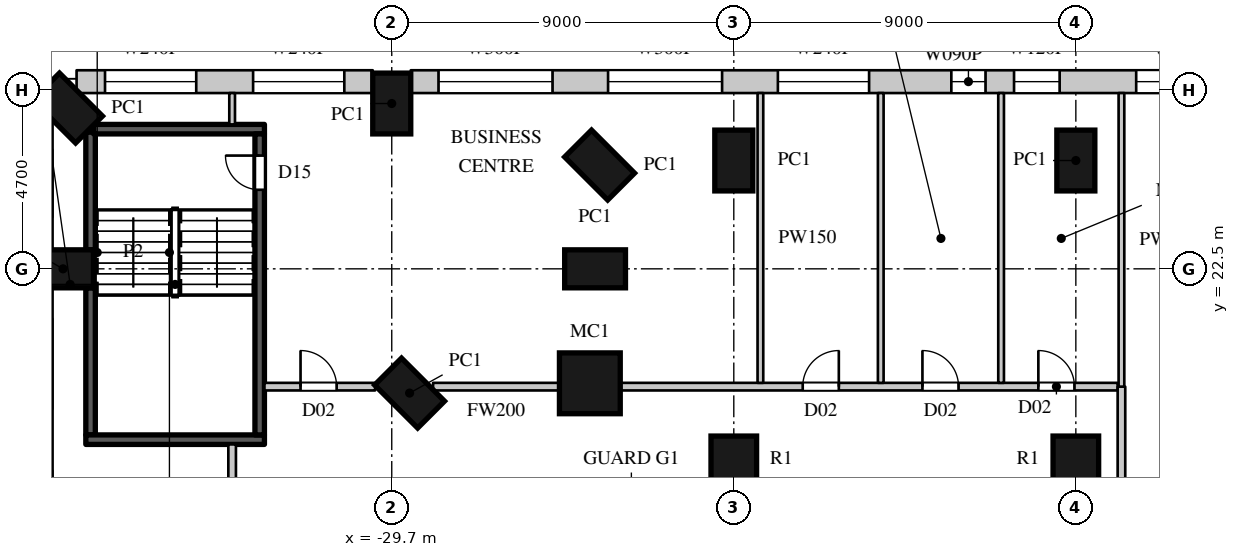
"""IFC4 building model, lengths in metres.
Left out: names, types, materials, properties, quantities, classifications, styles, units other than length and angle.
Written with IfcOpenShell. Run it as: python <this file> out.ifc"""

import sys

from ifc_helpers import new_model, si_unit, direction, frame, frame_2d, origin, origin_2d, place, context, subcontext, project, spatial, rectangle, circle, extrude, element, fill, save


model = new_model("IFC4")
c1 = context("Model", 3, precision=1e-05, world=origin(), true_north=direction((0.0, 1.0)))
c2 = subcontext(c1, "Body", "Model", "MODEL_VIEW")
j1 = project(units=[si_unit("LENGTHUNIT", "METRE"), si_unit("PLANEANGLEUNIT", "RADIAN")], contexts=[c1])
p1 = place(None, origin())
s1 = spatial("IfcSite", under=j1, at=p1, CompositionType="ELEMENT")
p2 = place(p1, origin())
s2 = spatial("IfcBuilding", under=s1, at=p2, CompositionType="ELEMENT")
p3 = place(p2, frame((0.0, 0.0, 44.0)))
s3 = spatial("IfcBuildingStorey", under=s2, at=p3, CompositionType="ELEMENT", Elevation=44.0)
for number, where, z_axis, x_axis in (
    (1, (-29.231, 19.231, 0.0), (0.0, 0.0, 1.0), (-0.707, -0.707, 0.0)),
    (2, (-11.7, 25.35, 0.0), (0.0, 0.0, 1.0), (-1.0, 0.0, 0.0)),
    (3, (-20.7, 25.35, 0.0), (0.0, 0.0, 1.0), (-1.0, 0.0, 0.0)),
    (4, (-24.231, 25.231, 0.0), (0.0, 0.0, 1.0), (-0.707, -0.707, 0.0)),
    (5, (-24.35, 22.5, 0.0), (0.0, 0.0, 1.0), (0.0, -1.0, 0.0)),
):
    element("IfcColumn", number, at=place(p3, frame(where, z_axis=z_axis, x_axis=x_axis)), inside=s3, PredefinedType="COLUMN", context=c2, shape_type="SweptSolid", body=[
        extrude(rectangle(XDim=1.0, YDim=1.6, at=origin_2d()), origin(), (0.0, 0.0, 1.0), 6.0),
    ])
p4 = place(p3, frame((-24.488, 19.488, 0.0), z_axis=(0.0, 0.0, 1.0), x_axis=(1.0, 0.0, 0.0)))
e6 = element("IfcColumn", 6, at=p4, inside=s3, PredefinedType="COLUMN", context=c2, shape_type="SweptSolid", body=[
    extrude(circle(Radius=0.8, at=origin_2d()), origin(), (0.0, 0.0, 1.0), 6.0),
])
for number, where, z_axis, x_axis in (
    (7, (-29.7, 26.85, 0.0), (0.0, 0.0, 1.0), (-1.0, 0.0, 0.0)),
    (8, (-38.231, 26.731, 0.0), (0.0, 0.0, 1.0), (-0.707, -0.707, 0.0)),
    (9, (-38.35, 22.5, 0.0), (0.0, 0.0, 1.0), (0.0, -1.0, 0.0)),
):
    element("IfcColumn", number, at=place(p3, frame(where, z_axis=z_axis, x_axis=x_axis)), inside=s3, PredefinedType="COLUMN", context=c2, shape_type="SweptSolid", body=[
        extrude(rectangle(XDim=1.0, YDim=1.6, at=origin_2d()), origin(), (0.0, 0.0, 1.0), 6.0),
    ])
for number, where, z_axis, x_axis in (
    (10, (-20.7, 17.5, 0.0), (0.0, 0.0, 1.0), (1.0, 0.0, 0.0)),
    (11, (-11.7, 17.5, 0.0), (0.0, 0.0, 1.0), (1.0, 0.0, 0.0)),
):
    element("IfcColumn", number, at=place(p3, frame(where, z_axis=z_axis, x_axis=x_axis)), inside=s3, PredefinedType="COLUMN", context=c2, shape_type="SweptSolid", body=[
        extrude(circle(Radius=0.6, at=origin_2d()), origin(), (0.0, 0.0, 1.0), 6.0),
    ])
p5 = place(p3, frame((24.334, 27.425, 0.0), z_axis=(0.0, 0.0, 1.0), x_axis=(-1.0, 0.0, 0.0)))
e12 = element("IfcWall", 12, at=p5, inside=s3, PredefinedType="ELEMENTEDWALL", context=c2, shape_type="SweptSolid", body=[
    extrude(rectangle(XDim=53.534, YDim=0.6, at=frame_2d((26.767, 0.0))), origin(), (0.0, 0.0, 1.0), 5.596),
])
p6 = place(p5, frame((0.731, 0.0, 1.2)))
e13 = element("IfcOpeningElement", 13, at=p6, cuts=e12, PredefinedType="OPENING", context=c2, shape_type="SweptSolid", body=[
    extrude(rectangle(XDim=3.0, YDim=2.4, at=frame_2d((1.5, 1.2))), frame((0.0, 0.31, 0.0), z_axis=(0.0, -1.0, 0.0), x_axis=(1.0, 0.0, 0.0)), (0.0, 0.0, 1.0), 0.62),
])
p7 = place(p5, frame((5.192, 0.0, 1.2)))
e14 = element("IfcOpeningElement", 14, at=p7, cuts=e12, PredefinedType="OPENING", context=c2, shape_type="SweptSolid", body=[
    extrude(rectangle(XDim=3.0, YDim=2.4, at=frame_2d((1.5, 1.2))), frame((0.0, 0.31, 0.0), z_axis=(0.0, -1.0, 0.0), x_axis=(1.0, 0.0, 0.0)), (0.0, 0.0, 1.0), 0.62),
])
p8 = place(p5, frame((14.114, 0.0, 1.2)))
e15 = element("IfcOpeningElement", 15, at=p8, cuts=e12, PredefinedType="OPENING", context=c2, shape_type="SweptSolid", body=[
    extrude(rectangle(XDim=3.0, YDim=2.4, at=frame_2d((1.5, 1.2))), frame((0.0, 0.31, 0.0), z_axis=(0.0, -1.0, 0.0), x_axis=(1.0, 0.0, 0.0)), (0.0, 0.0, 1.0), 0.62),
])
p9 = place(p5, frame((18.575, 0.0, 1.2)))
e16 = element("IfcOpeningElement", 16, at=p9, cuts=e12, PredefinedType="OPENING", context=c2, shape_type="SweptSolid", body=[
    extrude(rectangle(XDim=3.0, YDim=2.4, at=frame_2d((1.5, 1.2))), frame((0.0, 0.31, 0.0), z_axis=(0.0, -1.0, 0.0), x_axis=(1.0, 0.0, 0.0)), (0.0, 0.0, 1.0), 0.62),
])
p10 = place(p5, frame((23.037, 0.0, 1.2)))
e17 = element("IfcOpeningElement", 17, at=p10, cuts=e12, PredefinedType="OPENING", context=c2, shape_type="SweptSolid", body=[
    extrude(rectangle(XDim=3.0, YDim=2.4, at=frame_2d((1.5, 1.2))), frame((0.0, 0.31, 0.0), z_axis=(0.0, -1.0, 0.0), x_axis=(1.0, 0.0, 0.0)), (0.0, 0.0, 1.0), 0.62),
])
p11 = place(p5, frame((27.498, 0.0, 1.2)))
e18 = element("IfcOpeningElement", 18, at=p11, cuts=e12, PredefinedType="OPENING", context=c2, shape_type="SweptSolid", body=[
    extrude(rectangle(XDim=3.0, YDim=2.4, at=frame_2d((1.5, 1.2))), frame((0.0, 0.31, 0.0), z_axis=(0.0, -1.0, 0.0), x_axis=(1.0, 0.0, 0.0)), (0.0, 0.0, 1.0), 0.62),
])
p12 = place(p5, frame((45.343, 0.0, 1.2)))
e19 = element("IfcOpeningElement", 19, at=p12, cuts=e12, PredefinedType="OPENING", context=c2, shape_type="SweptSolid", body=[
    extrude(rectangle(XDim=3.0, YDim=2.4, at=frame_2d((1.5, 1.2))), frame((0.0, 0.31, 0.0), z_axis=(0.0, -1.0, 0.0), x_axis=(1.0, 0.0, 0.0)), (0.0, 0.0, 1.0), 0.62),
])
p13 = place(p5, frame((49.804, 0.0, 1.2)))
e20 = element("IfcOpeningElement", 20, at=p13, cuts=e12, PredefinedType="OPENING", context=c2, shape_type="SweptSolid", body=[
    extrude(rectangle(XDim=3.0, YDim=2.4, at=frame_2d((1.5, 1.2))), frame((0.0, 0.31, 0.0), z_axis=(0.0, -1.0, 0.0), x_axis=(1.0, 0.0, 0.0)), (0.0, 0.0, 1.0), 0.62),
])
p14 = place(p5, frame((10.194, 0.0, 1.2)))
e21 = element("IfcOpeningElement", 21, at=p14, cuts=e12, PredefinedType="OPENING", context=c2, shape_type="SweptSolid", body=[
    extrude(rectangle(XDim=2.4, YDim=2.4, at=frame_2d((1.2, 1.2))), frame((0.0, 0.31, 0.0), z_axis=(0.0, -1.0, 0.0), x_axis=(1.0, 0.0, 0.0)), (0.0, 0.0, 1.0), 0.62),
])
p15 = place(p5, frame((32.047, 0.0, 1.2)))
e22 = element("IfcOpeningElement", 22, at=p15, cuts=e12, PredefinedType="OPENING", context=c2, shape_type="SweptSolid", body=[
    extrude(rectangle(XDim=2.4, YDim=2.4, at=frame_2d((1.2, 1.2))), frame((0.0, 0.31, 0.0), z_axis=(0.0, -1.0, 0.0), x_axis=(1.0, 0.0, 0.0)), (0.0, 0.0, 1.0), 0.62),
])
p16 = place(p5, frame((36.461, 0.0, 1.2)))
e23 = element("IfcOpeningElement", 23, at=p16, cuts=e12, PredefinedType="OPENING", context=c2, shape_type="SweptSolid", body=[
    extrude(rectangle(XDim=1.2, YDim=2.4, at=frame_2d((0.6, 1.2))), frame((0.0, 0.31, 0.0), z_axis=(0.0, -1.0, 0.0), x_axis=(1.0, 0.0, 0.0)), (0.0, 0.0, 1.0), 0.62),
])
p17 = place(p5, frame((38.411, 0.0, 1.2)))
e24 = element("IfcOpeningElement", 24, at=p17, cuts=e12, PredefinedType="OPENING", context=c2, shape_type="SweptSolid", body=[
    extrude(rectangle(XDim=0.9, YDim=2.4, at=frame_2d((0.45, 1.2))), frame((0.0, 0.31, 0.0), z_axis=(0.0, -1.0, 0.0), x_axis=(1.0, 0.0, 0.0)), (0.0, 0.0, 1.0), 0.62),
])
p18 = place(p5, frame((41.475, 0.0, 1.2)))
e25 = element("IfcOpeningElement", 25, at=p18, cuts=e12, PredefinedType="OPENING", context=c2, shape_type="SweptSolid", body=[
    extrude(rectangle(XDim=2.4, YDim=2.4, at=frame_2d((1.2, 1.2))), frame((0.0, 0.31, 0.0), z_axis=(0.0, -1.0, 0.0), x_axis=(1.0, 0.0, 0.0)), (0.0, 0.0, 1.0), 0.62),
])
p19 = place(p3, frame((-30.2, 27.425, 0.0), z_axis=(0.0, 0.0, 1.0), x_axis=(-1.0, 0.0, 0.0)))
e26 = element("IfcWall", 26, at=p19, inside=s3, PredefinedType="ELEMENTEDWALL", context=c2, shape_type="SweptSolid", body=[
    extrude(rectangle(XDim=7.793, YDim=0.6, at=frame_2d((3.896, 0.0))), origin(), (0.0, 0.0, 1.0), 5.596),
])
p20 = place(p19, frame((0.748, 0.0, 1.2)))
e27 = element("IfcOpeningElement", 27, at=p20, cuts=e26, PredefinedType="OPENING", context=c2, shape_type="SweptSolid", body=[
    extrude(rectangle(XDim=2.4, YDim=2.4, at=frame_2d((1.2, 1.2))), frame((0.0, 0.31, 0.0), z_axis=(0.0, -1.0, 0.0), x_axis=(1.0, 0.0, 0.0)), (0.0, 0.0, 1.0), 0.62),
])
p21 = place(p19, frame((4.645, 0.0, 1.2)))
e28 = element("IfcOpeningElement", 28, at=p21, cuts=e26, PredefinedType="OPENING", context=c2, shape_type="SweptSolid", body=[
    extrude(rectangle(XDim=2.4, YDim=2.4, at=frame_2d((1.2, 1.2))), frame((0.0, 0.31, 0.0), z_axis=(0.0, -1.0, 0.0), x_axis=(1.0, 0.0, 0.0)), (0.0, 0.0, 1.0), 0.62),
])
p22 = place(p3, frame((-33.9, -17.88, 0.0), z_axis=(0.0, 0.0, 1.0), x_axis=(0.0, 1.0, 0.0)))
e29 = element("IfcWall", 29, at=p22, inside=s3, PredefinedType="PARTITIONING", context=c2, shape_type="SweptSolid", body=[
    extrude(rectangle(XDim=35.76, YDim=0.2, at=frame_2d((17.88, 0.0))), origin(), (0.0, 0.0, 1.0), 5.596),
])
p23 = place(p22, frame((1.05, 0.0, 0.0)))
e30 = element("IfcOpeningElement", 30, at=p23, cuts=e29, PredefinedType="OPENING", context=c2, shape_type="SweptSolid", body=[
    extrude(rectangle(XDim=0.9, YDim=2.2, at=frame_2d((0.45, 1.1))), frame((0.0, 0.11, 0.0), z_axis=(0.0, -1.0, 0.0), x_axis=(1.0, 0.0, 0.0)), (0.0, 0.0, 1.0), 0.22),
])
p24 = place(p22, frame((4.9, 0.0, 0.0)))
e31 = element("IfcOpeningElement", 31, at=p24, cuts=e29, PredefinedType="OPENING", context=c2, shape_type="SweptSolid", body=[
    extrude(rectangle(XDim=0.9, YDim=2.2, at=frame_2d((0.45, 1.1))), frame((0.0, 0.11, 0.0), z_axis=(0.0, -1.0, 0.0), x_axis=(1.0, 0.0, 0.0)), (0.0, 0.0, 1.0), 0.22),
])
p25 = place(p22, frame((8.9, 0.0, 0.0)))
e32 = element("IfcOpeningElement", 32, at=p25, cuts=e29, PredefinedType="OPENING", context=c2, shape_type="SweptSolid", body=[
    extrude(rectangle(XDim=0.9, YDim=2.2, at=frame_2d((0.45, 1.1))), frame((0.0, 0.11, 0.0), z_axis=(0.0, -1.0, 0.0), x_axis=(1.0, 0.0, 0.0)), (0.0, 0.0, 1.0), 0.22),
])
p26 = place(p22, frame((12.9, 0.0, 0.0)))
e33 = element("IfcOpeningElement", 33, at=p26, cuts=e29, PredefinedType="OPENING", context=c2, shape_type="SweptSolid", body=[
    extrude(rectangle(XDim=0.95, YDim=2.2, at=frame_2d((0.475, 1.1))), frame((0.0, 0.11, 0.0), z_axis=(0.0, -1.0, 0.0), x_axis=(1.0, 0.0, 0.0)), (0.0, 0.0, 1.0), 0.22),
])
p27 = place(p22, frame((21.4, 0.0, 0.0)))
e34 = element("IfcOpeningElement", 34, at=p27, cuts=e29, PredefinedType="OPENING", context=c2, shape_type="SweptSolid", body=[
    extrude(rectangle(XDim=0.95, YDim=2.2, at=frame_2d((0.475, 1.1))), frame((0.0, 0.11, 0.0), z_axis=(0.0, -1.0, 0.0), x_axis=(1.0, 0.0, 0.0)), (0.0, 0.0, 1.0), 0.22),
])
p28 = place(p22, frame((31.25, 0.0, 0.0)))
e35 = element("IfcOpeningElement", 35, at=p28, cuts=e29, PredefinedType="OPENING", context=c2, shape_type="SweptSolid", body=[
    extrude(rectangle(XDim=0.95, YDim=2.2, at=frame_2d((0.475, 1.1))), frame((0.0, 0.11, 0.0), z_axis=(0.0, -1.0, 0.0), x_axis=(1.0, 0.0, 0.0)), (0.0, 0.0, 1.0), 0.22),
])
p29 = place(p3, frame((-33.05, 19.4, 0.0), z_axis=(0.0, 0.0, 1.0), x_axis=(1.0, 0.0, 0.0)))
e36 = element("IfcWall", 36, at=p29, inside=s3, PredefinedType="PARTITIONING", context=c2, shape_type="SweptSolid", body=[
    extrude(rectangle(XDim=2.913, YDim=0.2, at=frame_2d((1.457, 0.0))), origin(), (0.0, 0.0, 1.0), 5.596),
])
p30 = place(p29, frame((0.95, 0.0, 0.0)))
e37 = element("IfcOpeningElement", 37, at=p30, cuts=e36, PredefinedType="OPENING", context=c2, shape_type="SweptSolid", body=[
    extrude(rectangle(XDim=0.95, YDim=2.2, at=frame_2d((0.475, 1.1))), frame((0.0, 0.11, 0.0), z_axis=(0.0, -1.0, 0.0), x_axis=(1.0, 0.0, 0.0)), (0.0, 0.0, 1.0), 0.22),
])
p31 = place(p3, frame((-28.613, 19.4, 0.0), z_axis=(0.0, 0.0, 1.0), x_axis=(1.0, 0.0, 0.0)))
e38 = element("IfcWall", 38, at=p31, inside=s3, PredefinedType="PARTITIONING", context=c2, shape_type="SweptSolid", body=[
    extrude(rectangle(XDim=3.323, YDim=0.2, at=frame_2d((1.662, 0.0))), origin(), (0.0, 0.0, 1.0), 3.85),
])
p32 = place(p3, frame((-23.687, 19.4, 0.0), z_axis=(0.0, 0.0, 1.0), x_axis=(1.0, 0.0, 0.0)))
e39 = element("IfcWall", 39, at=p32, inside=s3, PredefinedType="PARTITIONING", context=c2, shape_type="SweptSolid", body=[
    extrude(rectangle(XDim=13.086, YDim=0.2, at=frame_2d((6.543, 0.0))), origin(), (0.0, 0.0, 1.0), 5.596),
])
p33 = place(p32, frame((4.8, 0.0, 0.0)))
e40 = element("IfcOpeningElement", 40, at=p33, cuts=e39, PredefinedType="OPENING", context=c2, shape_type="SweptSolid", body=[
    extrude(rectangle(XDim=0.95, YDim=2.2, at=frame_2d((0.475, 1.1))), frame((0.0, 0.11, 0.0), z_axis=(0.0, -1.0, 0.0), x_axis=(1.0, 0.0, 0.0)), (0.0, 0.0, 1.0), 0.22),
])
p34 = place(p32, frame((7.95, 0.0, 0.0)))
e41 = element("IfcOpeningElement", 41, at=p34, cuts=e39, PredefinedType="OPENING", context=c2, shape_type="SweptSolid", body=[
    extrude(rectangle(XDim=0.95, YDim=2.2, at=frame_2d((0.475, 1.1))), frame((0.0, 0.11, 0.0), z_axis=(0.0, -1.0, 0.0), x_axis=(1.0, 0.0, 0.0)), (0.0, 0.0, 1.0), 0.22),
])
p35 = place(p32, frame((11.0, 0.0, 0.0)))
e42 = element("IfcOpeningElement", 42, at=p35, cuts=e39, PredefinedType="OPENING", context=c2, shape_type="SweptSolid", body=[
    extrude(rectangle(XDim=0.95, YDim=2.2, at=frame_2d((0.475, 1.1))), frame((0.0, 0.11, 0.0), z_axis=(0.0, -1.0, 0.0), x_axis=(1.0, 0.0, 0.0)), (0.0, 0.0, 1.0), 0.22),
])
p36 = place(p3, frame((-10.5, -19.4, 0.0), z_axis=(0.0, 0.0, 1.0), x_axis=(0.0, 1.0, 0.0)))
e43 = element("IfcWall", 43, at=p36, inside=s3, PredefinedType="PARTITIONING", context=c2, shape_type="SweptSolid", body=[
    extrude(rectangle(XDim=38.8, YDim=0.2, at=frame_2d((19.4, 0.0))), origin(), (0.0, 0.0, 1.0), 5.596),
])
p37 = place(p36, frame((18.65, 0.0, 0.0)))
e44 = element("IfcOpeningElement", 44, at=p37, cuts=e43, PredefinedType="OPENING", context=c2, shape_type="SweptSolid", body=[
    extrude(rectangle(XDim=1.5, YDim=2.4, at=frame_2d((0.75, 1.2))), frame((0.0, 0.11, 0.0), z_axis=(0.0, -1.0, 0.0), x_axis=(1.0, 0.0, 0.0)), (0.0, 0.0, 1.0), 0.22),
])
p38 = place(p3, frame((-33.9, 26.3, 0.0), z_axis=(0.0, 0.0, 1.0), x_axis=(0.0, 1.0, 0.0)))
e45 = element("IfcWall", 45, at=p38, inside=s3, PredefinedType="PARTITIONING", context=c2, shape_type="SweptSolid", body=[
    extrude(rectangle(XDim=0.825, YDim=0.15, at=frame_2d((0.413, 0.0))), origin(), (0.0, 0.0, 1.0), 5.596),
])
for number, where, z_axis, x_axis in (
    (46, (-20.0, 19.5, 0.0), (0.0, 0.0, 1.0), (0.0, 1.0, 0.0)),
    (47, (-16.833, 19.5, 0.0), (0.0, 0.0, 1.0), (0.0, 1.0, 0.0)),
    (48, (-13.667, 19.5, 0.0), (0.0, 0.0, 1.0), (0.0, 1.0, 0.0)),
):
    element("IfcWall", number, at=place(p3, frame(where, z_axis=z_axis, x_axis=x_axis)), inside=s3, PredefinedType="PARTITIONING", context=c2, shape_type="SweptSolid", body=[
        extrude(rectangle(XDim=7.625, YDim=0.15, at=frame_2d((3.812, 0.0))), origin(), (0.0, 0.0, 1.0), 5.596),
    ])
p39 = place(p3, frame((-10.5, 19.4, 0.0), z_axis=(0.0, 0.0, 1.0), x_axis=(0.0, 1.0, 0.0)))
e49 = element("IfcWall", 49, at=p39, inside=s3, PredefinedType="PARTITIONING", context=c2, shape_type="SweptSolid", body=[
    extrude(rectangle(XDim=7.725, YDim=0.15, at=frame_2d((3.863, 0.0))), origin(), (0.0, 0.0, 1.0), 5.596),
])
p40 = place(p3, frame((-37.625, 18.13, 0.0), z_axis=(0.0, 0.0, 1.0), x_axis=(0.0, 1.0, 0.0)))
e50 = element("IfcWall", 50, at=p40, inside=s3, PredefinedType="SHEAR", context=c2, shape_type="SweptSolid", body=[
    extrude(rectangle(XDim=3.87, YDim=0.25, at=frame_2d((1.935, 0.0))), origin(), (0.0, 0.0, 1.0), 5.596),
])
p41 = place(p3, frame((-37.625, 23.0, 0.0), z_axis=(0.0, 0.0, 1.0), x_axis=(0.0, 1.0, 0.0)))
e51 = element("IfcWall", 51, at=p41, inside=s3, PredefinedType="SHEAR", context=c2, shape_type="SweptSolid", body=[
    extrude(rectangle(XDim=3.095, YDim=0.25, at=frame_2d((1.548, 0.0))), origin(), (0.0, 0.0, 1.0), 5.596),
])
p42 = place(p3, frame((-37.75, 18.005, 0.0), z_axis=(0.0, 0.0, 1.0), x_axis=(1.0, 0.0, 0.0)))
e52 = element("IfcWall", 52, at=p42, inside=s3, PredefinedType="SHEAR", context=c2, shape_type="SweptSolid", body=[
    extrude(rectangle(XDim=4.7, YDim=0.25, at=frame_2d((2.35, 0.0))), origin(), (0.0, 0.0, 1.0), 5.596),
])
p43 = place(p3, frame((-37.545, 26.175, 0.0), z_axis=(0.0, 0.0, 1.0), x_axis=(1.0, 0.0, 0.0)))
e53 = element("IfcWall", 53, at=p43, inside=s3, PredefinedType="SHEAR", context=c2, shape_type="SweptSolid", body=[
    extrude(rectangle(XDim=4.495, YDim=0.25, at=frame_2d((2.248, 0.0))), origin(), (0.0, 0.0, 1.0), 5.596),
])
p44 = place(p3, frame((-33.175, 18.13, 0.0), z_axis=(0.0, 0.0, 1.0), x_axis=(0.0, 1.0, 0.0)))
e54 = element("IfcWall", 54, at=p44, inside=s3, PredefinedType="SHEAR", context=c2, shape_type="SweptSolid", body=[
    extrude(rectangle(XDim=7.92, YDim=0.25, at=frame_2d((3.96, 0.0))), origin(), (0.0, 0.0, 1.0), 5.596),
])
p45 = place(p44, frame((6.45, 0.0, 0.0)))
e55 = element("IfcOpeningElement", 55, at=p45, cuts=e54, PredefinedType="OPENING", context=c2, shape_type="SweptSolid", body=[
    extrude(rectangle(XDim=0.9, YDim=2.2, at=frame_2d((0.45, 1.1))), frame((0.0, 0.135, 0.0), z_axis=(0.0, -1.0, 0.0), x_axis=(1.0, 0.0, 0.0)), (0.0, 0.0, 1.0), 0.27),
])
p46 = place(p12, origin())
e56 = element("IfcWindow", 56, at=p46, inside=s3, PartitioningType="SINGLE_PANEL", PredefinedType="WINDOW", context=c2, shape_type="SweptSolid", body=[
    extrude(rectangle(XDim=3.0, YDim=2.4, at=frame_2d((1.5, 1.2))), frame((0.0, 0.06, 0.0), z_axis=(0.0, -1.0, 0.0), x_axis=(1.0, 0.0, 0.0)), (0.0, 0.0, 1.0), 0.06),
])
fill(e19, e56)
p47 = place(p13, origin())
e57 = element("IfcWindow", 57, at=p47, inside=s3, PartitioningType="SINGLE_PANEL", PredefinedType="WINDOW", context=c2, shape_type="SweptSolid", body=[
    extrude(rectangle(XDim=3.0, YDim=2.4, at=frame_2d((1.5, 1.2))), frame((0.0, 0.06, 0.0), z_axis=(0.0, -1.0, 0.0), x_axis=(1.0, 0.0, 0.0)), (0.0, 0.0, 1.0), 0.06),
])
fill(e20, e57)
p48 = place(p20, origin())
e58 = element("IfcWindow", 58, at=p48, inside=s3, PartitioningType="SINGLE_PANEL", PredefinedType="WINDOW", context=c2, shape_type="SweptSolid", body=[
    extrude(rectangle(XDim=2.4, YDim=2.4, at=frame_2d((1.2, 1.2))), frame((0.0, 0.06, 0.0), z_axis=(0.0, -1.0, 0.0), x_axis=(1.0, 0.0, 0.0)), (0.0, 0.0, 1.0), 0.06),
])
fill(e27, e58)
p49 = place(p21, origin())
e59 = element("IfcWindow", 59, at=p49, inside=s3, PartitioningType="SINGLE_PANEL", PredefinedType="WINDOW", context=c2, shape_type="SweptSolid", body=[
    extrude(rectangle(XDim=2.4, YDim=2.4, at=frame_2d((1.2, 1.2))), frame((0.0, 0.06, 0.0), z_axis=(0.0, -1.0, 0.0), x_axis=(1.0, 0.0, 0.0)), (0.0, 0.0, 1.0), 0.06),
])
fill(e28, e59)
p50 = place(p30, origin())
e60 = element("IfcDoor", 60, at=p50, inside=s3, OperationType="SINGLE_SWING_LEFT", PredefinedType="DOOR", context=c2, shape_type="SweptSolid", body=[
    extrude(rectangle(XDim=0.95, YDim=2.2, at=frame_2d((0.475, 1.1))), frame((0.0, 0.025, 0.0), z_axis=(0.0, -1.0, 0.0), x_axis=(1.0, 0.0, 0.0)), (0.0, 0.0, 1.0), 0.05),
])
fill(e37, e60)
p51 = place(p33, origin())
e61 = element("IfcDoor", 61, at=p51, inside=s3, OperationType="SINGLE_SWING_RIGHT", PredefinedType="DOOR", context=c2, shape_type="SweptSolid", body=[
    extrude(rectangle(XDim=0.95, YDim=2.2, at=frame_2d((0.475, 1.1))), frame((0.0, 0.025, 0.0), z_axis=(0.0, -1.0, 0.0), x_axis=(1.0, 0.0, 0.0)), (0.0, 0.0, 1.0), 0.05),
])
fill(e40, e61)
p52 = place(p34, origin())
e62 = element("IfcDoor", 62, at=p52, inside=s3, OperationType="SINGLE_SWING_LEFT", PredefinedType="DOOR", context=c2, shape_type="SweptSolid", body=[
    extrude(rectangle(XDim=0.95, YDim=2.2, at=frame_2d((0.475, 1.1))), frame((0.0, 0.025, 0.0), z_axis=(0.0, -1.0, 0.0), x_axis=(1.0, 0.0, 0.0)), (0.0, 0.0, 1.0), 0.05),
])
fill(e41, e62)
p53 = place(p35, origin())
e63 = element("IfcDoor", 63, at=p53, inside=s3, OperationType="SINGLE_SWING_LEFT", PredefinedType="DOOR", context=c2, shape_type="SweptSolid", body=[
    extrude(rectangle(XDim=0.95, YDim=2.2, at=frame_2d((0.475, 1.1))), frame((0.0, 0.025, 0.0), z_axis=(0.0, -1.0, 0.0), x_axis=(1.0, 0.0, 0.0)), (0.0, 0.0, 1.0), 0.05),
])
fill(e42, e63)
p54 = place(p45, origin())
e64 = element("IfcDoor", 64, at=p54, inside=s3, OperationType="SINGLE_SWING_RIGHT", PredefinedType="DOOR", context=c2, shape_type="SweptSolid", body=[
    extrude(rectangle(XDim=0.9, YDim=2.2, at=frame_2d((0.45, 1.1))), frame((0.0, 0.025, 0.0), z_axis=(0.0, -1.0, 0.0), x_axis=(1.0, 0.0, 0.0)), (0.0, 0.0, 1.0), 0.05),
])
fill(e55, e64)
p55 = place(p15, origin())
e65 = element("IfcWindow", 65, at=p55, inside=s3, PartitioningType="SINGLE_PANEL", PredefinedType="WINDOW", context=c2, shape_type="SweptSolid", body=[
    extrude(rectangle(XDim=2.4, YDim=2.4, at=frame_2d((1.2, 1.2))), frame((0.0, 0.06, 0.0), z_axis=(0.0, -1.0, 0.0), x_axis=(1.0, 0.0, 0.0)), (0.0, 0.0, 1.0), 0.06),
])
fill(e22, e65)
p56 = place(p16, origin())
e66 = element("IfcWindow", 66, at=p56, inside=s3, PartitioningType="SINGLE_PANEL", PredefinedType="WINDOW", context=c2, shape_type="SweptSolid", body=[
    extrude(rectangle(XDim=1.2, YDim=2.4, at=frame_2d((0.6, 1.2))), frame((0.0, 0.06, 0.0), z_axis=(0.0, -1.0, 0.0), x_axis=(1.0, 0.0, 0.0)), (0.0, 0.0, 1.0), 0.06),
])
fill(e23, e66)
p57 = place(p17, origin())
e67 = element("IfcWindow", 67, at=p57, inside=s3, PartitioningType="SINGLE_PANEL", PredefinedType="WINDOW", context=c2, shape_type="SweptSolid", body=[
    extrude(rectangle(XDim=0.9, YDim=2.4, at=frame_2d((0.45, 1.2))), frame((0.0, 0.06, 0.0), z_axis=(0.0, -1.0, 0.0), x_axis=(1.0, 0.0, 0.0)), (0.0, 0.0, 1.0), 0.06),
])
fill(e24, e67)
p58 = place(p18, origin())
e68 = element("IfcWindow", 68, at=p58, inside=s3, PartitioningType="SINGLE_PANEL", PredefinedType="WINDOW", context=c2, shape_type="SweptSolid", body=[
    extrude(rectangle(XDim=2.4, YDim=2.4, at=frame_2d((1.2, 1.2))), frame((0.0, 0.06, 0.0), z_axis=(0.0, -1.0, 0.0), x_axis=(1.0, 0.0, 0.0)), (0.0, 0.0, 1.0), 0.06),
])
fill(e25, e68)
save(model, sys.argv[1])
